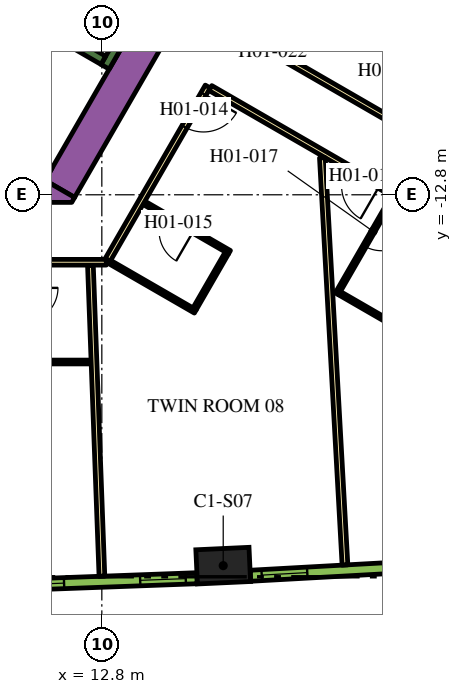
"""IFC4 building model, lengths in metres.
Left out: names, types, materials, properties, quantities, classifications, styles, units other than length and angle.
Written with IfcOpenShell. Run it as: python <this file> out.ifc"""

import sys

from ifc_helpers import new_model, si_unit, direction, frame, frame_2d, origin, origin_2d, place, context, subcontext, project, spatial, polyline, rectangle, outline, extrude, element, fill, save


model = new_model("IFC4")
c1 = context("Model", 3, precision=1e-05, world=origin(), true_north=direction((0.0, 1.0)))
c2 = subcontext(c1, "Body", "Model", "MODEL_VIEW")
j1 = project(units=[si_unit("LENGTHUNIT", "METRE"), si_unit("PLANEANGLEUNIT", "RADIAN")], contexts=[c1])
p1 = place(None, origin())
s1 = spatial("IfcSite", under=j1, at=p1, CompositionType="ELEMENT")
p2 = place(p1, origin())
s2 = spatial("IfcBuilding", under=s1, at=p2, CompositionType="ELEMENT")
p3 = place(p2, frame((0.0, 0.0, 31.5)))
s3 = spatial("IfcBuildingStorey", under=s2, at=p3, CompositionType="ELEMENT", Elevation=31.5)
p4 = place(p3, frame((15.994, -22.558, 0.0), z_axis=(0.0, 0.0, 1.0), x_axis=(0.998932216029, 0.04619986774, 0.0)))
e1 = element("IfcColumn", 1, at=p4, inside=s3, PredefinedType="COLUMN", context=c2, shape_type="SweptSolid", body=[
    extrude(rectangle(XDim=1.4, YDim=0.9, at=origin_2d()), origin(), (0.0, 0.0, 1.0), 3.9),
])
p5 = place(p3, frame((11.695, -12.644, 0.0), z_axis=(0.0, 0.0, 1.0), x_axis=(0.500010229568, 0.86601949766, 0.0)))
e2 = element("IfcWall", 2, at=p5, inside=s3, PredefinedType="SOLIDWALL", context=c2, shape_type="SweptSolid", body=[
    extrude(rectangle(XDim=9.326, YDim=0.9, at=frame_2d((4.663, 0.0))), origin(), (0.0, 0.0, 1.0), 3.9),
])
p6 = place(p3, origin())
e3 = element("IfcWall", 3, at=p6, inside=s3, PredefinedType="SOLIDWALL", context=c2, shape_type="SweptSolid", body=[
    extrude(outline(polyline([(12.009, -13.0), (11.312, -13.0), (11.312, -12.425), (12.083, -12.871), (12.009, -13.0)])), origin(), (0.0, 0.0, 1.0), 3.9),
])
p7 = place(p3, frame((12.885, -9.431, 0.0), z_axis=(0.0, 0.0, 1.0), x_axis=(0.500020560727, 0.866013532718, 0.0)))
e4 = element("IfcWall", 4, at=p7, inside=s3, PredefinedType="SOLIDWALL", context=c2, shape_type="SweptSolid", body=[
    extrude(rectangle(XDim=3.45, YDim=0.25, at=frame_2d((1.725, 0.0))), origin(), (0.0, 0.0, 1.0), 3.9),
])
p8 = place(p3, frame((12.84, -9.261, 0.0), z_axis=(0.0, 0.0, 1.0), x_axis=(-0.866013990052, 0.500019768644, 0.0)))
e5 = element("IfcWall", 5, at=p8, inside=s3, PredefinedType="SOLIDWALL", context=c2, shape_type="SweptSolid", body=[
    extrude(rectangle(XDim=6.8, YDim=0.25, at=frame_2d((3.4, 0.0))), origin(), (0.0, 0.0, 1.0), 3.9),
])
p9 = place(p3, frame((16.412, -8.523, 0.0), z_axis=(0.0, 0.0, 1.0), x_axis=(0.866022197818, -0.500005552856, 0.0)))
e6 = element("IfcWall", 6, at=p9, inside=s3, PredefinedType="PARTITIONING", context=c2, shape_type="SweptSolid", body=[
    extrude(rectangle(XDim=16.224, YDim=0.15, at=frame_2d((8.112, 0.0))), origin(), (0.0, 0.0, 1.0), 2.75),
])
p10 = place(p9, frame((7.949, 0.0, 0.0)))
e7 = element("IfcOpeningElement", 7, at=p10, cuts=e6, PredefinedType="OPENING", context=c2, shape_type="SweptSolid", body=[
    extrude(rectangle(XDim=1.0, YDim=2.1, at=frame_2d((0.5, 1.05))), frame((0.0, 0.085, 0.0), z_axis=(0.0, -1.0, 0.0), x_axis=(1.0, 0.0, 0.0)), (0.0, 0.0, 1.0), 0.17),
])
p11 = place(p9, frame((0.526, 0.0, 0.0)))
e8 = element("IfcOpeningElement", 8, at=p11, cuts=e6, PredefinedType="OPENING", context=c2, shape_type="SweptSolid", body=[
    extrude(rectangle(XDim=1.0, YDim=2.1, at=frame_2d((0.5, 1.05))), frame((0.0, 0.085, 0.0), z_axis=(0.0, -1.0, 0.0), x_axis=(1.0, 0.0, 0.0)), (0.0, 0.0, 1.0), 0.17),
])
p12 = place(p3, frame((12.918, -14.575, 0.0), z_axis=(0.0, 0.0, 1.0), x_axis=(-1.0, 0.0, 0.0)))
e9 = element("IfcWall", 9, at=p12, inside=s3, PredefinedType="PARTITIONING", context=c2, shape_type="SweptSolid", body=[
    extrude(rectangle(XDim=25.766, YDim=0.15, at=frame_2d((12.883, 0.0))), origin(), (0.0, 0.0, 1.0), 2.75),
])
p13 = place(p12, frame((24.586, 0.0, 0.0)))
e10 = element("IfcOpeningElement", 10, at=p13, cuts=e9, PredefinedType="OPENING", context=c2, shape_type="SweptSolid", body=[
    extrude(rectangle(XDim=1.0, YDim=2.1, at=frame_2d((0.5, 1.05))), frame((0.0, 0.085, 0.0), z_axis=(0.0, -1.0, 0.0), x_axis=(1.0, 0.0, 0.0)), (0.0, 0.0, 1.0), 0.17),
])
p14 = place(p12, frame((16.195, 0.0, 0.0)))
e11 = element("IfcOpeningElement", 11, at=p14, cuts=e9, PredefinedType="OPENING", context=c2, shape_type="SweptSolid", body=[
    extrude(rectangle(XDim=1.0, YDim=2.1, at=frame_2d((0.5, 1.05))), frame((0.0, 0.085, 0.0), z_axis=(0.0, -1.0, 0.0), x_axis=(1.0, 0.0, 0.0)), (0.0, 0.0, 1.0), 0.17),
])
p15 = place(p12, frame((14.066, 0.0, 0.0)))
e12 = element("IfcOpeningElement", 12, at=p15, cuts=e9, PredefinedType="OPENING", context=c2, shape_type="SweptSolid", body=[
    extrude(rectangle(XDim=0.9, YDim=2.1, at=frame_2d((0.45, 1.05))), frame((0.0, 0.085, 0.0), z_axis=(0.0, -1.0, 0.0), x_axis=(1.0, 0.0, 0.0)), (0.0, 0.0, 1.0), 0.17),
])
p16 = place(p12, frame((6.824, 0.0, 0.0)))
e13 = element("IfcOpeningElement", 13, at=p16, cuts=e9, PredefinedType="OPENING", context=c2, shape_type="SweptSolid", body=[
    extrude(rectangle(XDim=1.0, YDim=2.1, at=frame_2d((0.5, 1.05))), frame((0.0, 0.085, 0.0), z_axis=(0.0, -1.0, 0.0), x_axis=(1.0, 0.0, 0.0)), (0.0, 0.0, 1.0), 0.17),
])
p17 = place(p12, frame((5.517, 0.0, 0.0)))
e14 = element("IfcOpeningElement", 14, at=p17, cuts=e9, PredefinedType="OPENING", context=c2, shape_type="SweptSolid", body=[
    extrude(rectangle(XDim=1.0, YDim=2.1, at=frame_2d((0.5, 1.05))), frame((0.0, 0.085, 0.0), z_axis=(0.0, -1.0, 0.0), x_axis=(1.0, 0.0, 0.0)), (0.0, 0.0, 1.0), 0.17),
])
p18 = place(p3, frame((15.587, -9.952, 0.0), z_axis=(0.0, 0.0, 1.0), x_axis=(-0.500016618951, -0.866015808616, 0.0)))
e15 = element("IfcWall", 15, at=p18, inside=s3, PredefinedType="PARTITIONING", context=c2, shape_type="SweptSolid", body=[
    extrude(rectangle(XDim=5.268, YDim=0.15, at=frame_2d((2.634, 0.0))), origin(), (0.0, 0.0, 1.0), 2.75),
])
p19 = place(p18, frame((0.225, 0.0, 0.0)))
e16 = element("IfcOpeningElement", 16, at=p19, cuts=e15, PredefinedType="OPENING", context=c2, shape_type="SweptSolid", body=[
    extrude(rectangle(XDim=1.0, YDim=2.1, at=frame_2d((0.5, 1.05))), frame((0.0, 0.085, 0.0), z_axis=(0.0, -1.0, 0.0), x_axis=(1.0, 0.0, 0.0)), (0.0, 0.0, 1.0), 0.17),
])
p20 = place(p3, frame((29.638, -18.064, 0.0), z_axis=(0.0, 0.0, 1.0), x_axis=(-0.866026175601, 0.499998663172, 0.0)))
e17 = element("IfcWall", 17, at=p20, inside=s3, PredefinedType="PARTITIONING", context=c2, shape_type="SweptSolid", body=[
    extrude(rectangle(XDim=16.144, YDim=0.15, at=frame_2d((8.072, 0.0))), origin(), (0.0, 0.0, 1.0), 2.75),
])
p21 = place(p20, frame((11.004, 0.0, 0.0)))
e18 = element("IfcOpeningElement", 18, at=p21, cuts=e17, PredefinedType="OPENING", context=c2, shape_type="SweptSolid", body=[
    extrude(rectangle(XDim=1.0, YDim=2.1, at=frame_2d((0.5, 1.05))), frame((0.0, 0.085, 0.0), z_axis=(0.0, -1.0, 0.0), x_axis=(1.0, 0.0, 0.0)), (0.0, 0.0, 1.0), 0.17),
])
p22 = place(p20, frame((7.275, 0.0, 0.0)))
e19 = element("IfcOpeningElement", 19, at=p22, cuts=e17, PredefinedType="OPENING", context=c2, shape_type="SweptSolid", body=[
    extrude(rectangle(XDim=1.0, YDim=2.1, at=frame_2d((0.5, 1.05))), frame((0.0, 0.085, 0.0), z_axis=(0.0, -1.0, 0.0), x_axis=(1.0, 0.0, 0.0)), (0.0, 0.0, 1.0), 0.17),
])
p23 = place(p3, frame((12.802, -22.836, 0.0), z_axis=(0.0, 0.0, 1.0), x_axis=(-0.036969723281, 0.999316386116, 0.0)))
e20 = element("IfcWall", 20, at=p23, inside=s3, PredefinedType="PARTITIONING", context=c2, shape_type="SweptSolid", body=[
    extrude(rectangle(XDim=8.182, YDim=0.15, at=frame_2d((4.091, 0.0))), origin(), (0.0, 0.0, 1.0), 2.75),
])
p24 = place(p3, frame((19.198, -22.541, 0.0), z_axis=(0.0, 0.0, 1.0), x_axis=(-0.055432210572, 0.99846245299, 0.0)))
e21 = element("IfcWall", 21, at=p24, inside=s3, PredefinedType="PARTITIONING", context=c2, shape_type="SweptSolid", body=[
    extrude(rectangle(XDim=10.729, YDim=0.15, at=frame_2d((5.365, 0.0))), origin(), (0.0, 0.0, 1.0), 2.75),
])
p25 = place(p3, frame((10.806, -17.2, 0.0), z_axis=(0.0, 0.0, 1.0), x_axis=(1.0, 0.0, 0.0)))
e22 = element("IfcWall", 22, at=p25, inside=s3, PredefinedType="PARTITIONING", context=c2, shape_type="SweptSolid", body=[
    extrude(rectangle(XDim=1.71, YDim=0.1, at=frame_2d((0.855, 0.0))), origin(), (0.0, 0.0, 1.0), 2.75),
])
p26 = place(p3, frame((16.16, -14.31, 0.0), z_axis=(0.0, 0.0, 1.0), x_axis=(-0.866062058628, 0.499936506574, 0.0)))
e23 = element("IfcWall", 23, at=p26, inside=s3, PredefinedType="PARTITIONING", context=c2, shape_type="SweptSolid", body=[
    extrude(rectangle(XDim=2.6, YDim=0.1, at=frame_2d((1.3, 0.0))), origin(), (0.0, 0.0, 1.0), 2.75),
])
p27 = place(p26, frame((1.1, 0.0, 0.0)))
e24 = element("IfcOpeningElement", 24, at=p27, cuts=e23, PredefinedType="OPENING", context=c2, shape_type="SweptSolid", body=[
    extrude(rectangle(XDim=0.9, YDim=2.1, at=frame_2d((0.45, 1.05))), frame((0.0, 0.06, 0.0), z_axis=(0.0, -1.0, 0.0), x_axis=(1.0, 0.0, 0.0)), (0.0, 0.0, 1.0), 0.12),
])
p28 = place(p3, frame((16.092, -14.329, 0.0), z_axis=(0.0, 0.0, 1.0), x_axis=(-0.500062241894, -0.865989465428, 0.0)))
e25 = element("IfcWall", 25, at=p28, inside=s3, PredefinedType="PARTITIONING", context=c2, shape_type="SweptSolid", body=[
    extrude(rectangle(XDim=1.7, YDim=0.1, at=frame_2d((0.85, 0.0))), origin(), (0.0, 0.0, 1.0), 2.75),
])
p29 = place(p3, frame((13.008, -14.569, 0.0), z_axis=(0.0, 0.0, 1.0), x_axis=(0.865997922154, -0.500047596559, 0.0)))
e26 = element("IfcWall", 26, at=p29, inside=s3, PredefinedType="PARTITIONING", context=c2, shape_type="SweptSolid", body=[
    extrude(rectangle(XDim=2.6, YDim=0.1, at=frame_2d((1.3, 0.0))), origin(), (0.0, 0.0, 1.0), 2.75),
])
p30 = place(p3, frame((20.461, -12.852, 0.0), z_axis=(0.0, 0.0, 1.0), x_axis=(-0.49997559174, -0.866039495442, 0.0)))
e27 = element("IfcWall", 27, at=p30, inside=s3, PredefinedType="PARTITIONING", context=c2, shape_type="SweptSolid", body=[
    extrude(rectangle(XDim=2.95, YDim=0.1, at=frame_2d((1.475, 0.0))), origin(), (0.0, 0.0, 1.0), 2.75),
])
p31 = place(p30, frame((0.6, 0.0, 0.0)))
e28 = element("IfcOpeningElement", 28, at=p31, cuts=e27, PredefinedType="OPENING", context=c2, shape_type="SweptSolid", body=[
    extrude(rectangle(XDim=0.9, YDim=2.1, at=frame_2d((0.45, 1.05))), frame((0.0, 0.06, 0.0), z_axis=(0.0, -1.0, 0.0), x_axis=(1.0, 0.0, 0.0)), (0.0, 0.0, 1.0), 0.12),
])
p32 = place(p3, frame((19.054, -15.389, 0.0), z_axis=(0.0, 0.0, 1.0), x_axis=(0.866043940782, -0.499967891604, 0.0)))
e29 = element("IfcWall", 29, at=p32, inside=s3, PredefinedType="PARTITIONING", context=c2, shape_type="SweptSolid", body=[
    extrude(rectangle(XDim=1.55, YDim=0.1, at=frame_2d((0.775, 0.0))), origin(), (0.0, 0.0, 1.0), 2.75),
])
p33 = place(p3, frame((10.31, -23.074, 0.0), z_axis=(0.0, 0.0, 1.0), x_axis=(0.999317974969, 0.036926750529, 0.0)))
e30 = element("IfcWall", 30, at=p33, inside=s3, PredefinedType="SOLIDWALL", context=c2, shape_type="SweptSolid", body=[
    extrude(rectangle(XDim=4.998, YDim=0.29, at=frame_2d((2.499, 0.0))), origin(), (0.0, 0.0, 1.0), 3.65),
])
p34 = place(p33, frame((0.297, 0.0, 0.9)))
e31 = element("IfcOpeningElement", 31, at=p34, cuts=e30, PredefinedType="OPENING", context=c2, shape_type="SweptSolid", body=[
    extrude(rectangle(XDim=1.2, YDim=2.15, at=frame_2d((0.6, 1.075))), frame((0.0, 0.155, 0.0), z_axis=(0.0, -1.0, 0.0), x_axis=(1.0, 0.0, 0.0)), (0.0, 0.0, 1.0), 0.31),
])
p35 = place(p33, frame((3.501, 0.0, 0.9)))
e32 = element("IfcOpeningElement", 32, at=p35, cuts=e30, PredefinedType="OPENING", context=c2, shape_type="SweptSolid", body=[
    extrude(rectangle(XDim=1.2, YDim=2.15, at=frame_2d((0.6, 1.075))), frame((0.0, 0.155, 0.0), z_axis=(0.0, -1.0, 0.0), x_axis=(1.0, 0.0, 0.0)), (0.0, 0.0, 1.0), 0.31),
])
p36 = place(p3, frame((16.711, -22.824, 0.0), z_axis=(0.0, 0.0, 1.0), x_axis=(0.998464708705, 0.055391564976, 0.0)))
e33 = element("IfcWall", 33, at=p36, inside=s3, PredefinedType="SOLIDWALL", context=c2, shape_type="SweptSolid", body=[
    extrude(rectangle(XDim=4.998, YDim=0.29, at=frame_2d((2.499, 0.0))), origin(), (0.0, 0.0, 1.0), 3.65),
])
p37 = place(p36, frame((0.297, 0.0, 0.9)))
e34 = element("IfcOpeningElement", 34, at=p37, cuts=e33, PredefinedType="OPENING", context=c2, shape_type="SweptSolid", body=[
    extrude(rectangle(XDim=1.2, YDim=2.15, at=frame_2d((0.6, 1.075))), frame((0.0, 0.155, 0.0), z_axis=(0.0, -1.0, 0.0), x_axis=(1.0, 0.0, 0.0)), (0.0, 0.0, 1.0), 0.31),
])
p38 = place(p36, frame((3.501, 0.0, 0.9)))
e35 = element("IfcOpeningElement", 35, at=p38, cuts=e33, PredefinedType="OPENING", context=c2, shape_type="SweptSolid", body=[
    extrude(rectangle(XDim=1.2, YDim=2.15, at=frame_2d((0.6, 1.075))), frame((0.0, 0.155, 0.0), z_axis=(0.0, -1.0, 0.0), x_axis=(1.0, 0.0, 0.0)), (0.0, 0.0, 1.0), 0.31),
])
p39 = place(p19, origin())
e36 = element("IfcDoor", 36, at=p39, inside=s3, OperationType="SINGLE_SWING_LEFT", PredefinedType="DOOR", context=c2, shape_type="SweptSolid", body=[
    extrude(rectangle(XDim=1.0, YDim=2.1, at=frame_2d((0.5, 1.05))), frame((0.0, 0.025, 0.0), z_axis=(0.0, -1.0, 0.0), x_axis=(1.0, 0.0, 0.0)), (0.0, 0.0, 1.0), 0.05),
])
fill(e16, e36)
p40 = place(p27, origin())
e37 = element("IfcDoor", 37, at=p40, inside=s3, OperationType="SINGLE_SWING_LEFT", PredefinedType="DOOR", context=c2, shape_type="SweptSolid", body=[
    extrude(rectangle(XDim=0.9, YDim=2.1, at=frame_2d((0.45, 1.05))), frame((0.0, 0.025, 0.0), z_axis=(0.0, -1.0, 0.0), x_axis=(1.0, 0.0, 0.0)), (0.0, 0.0, 1.0), 0.05),
])
fill(e24, e37)
p41 = place(p21, origin())
e38 = element("IfcDoor", 38, at=p41, inside=s3, OperationType="SINGLE_SWING_RIGHT", PredefinedType="DOOR", context=c2, shape_type="SweptSolid", body=[
    extrude(rectangle(XDim=1.0, YDim=2.1, at=frame_2d((0.5, 1.05))), frame((0.0, 0.025, 0.0), z_axis=(0.0, -1.0, 0.0), x_axis=(1.0, 0.0, 0.0)), (0.0, 0.0, 1.0), 0.05),
])
fill(e18, e38)
p42 = place(p31, origin())
e39 = element("IfcDoor", 39, at=p42, inside=s3, OperationType="SINGLE_SWING_RIGHT", PredefinedType="DOOR", context=c2, shape_type="SweptSolid", body=[
    extrude(rectangle(XDim=0.9, YDim=2.1, at=frame_2d((0.45, 1.05))), frame((0.0, 0.025, 0.0), z_axis=(0.0, -1.0, 0.0), x_axis=(1.0, 0.0, 0.0)), (0.0, 0.0, 1.0), 0.05),
])
fill(e28, e39)
p43 = place(p11, origin())
e40 = element("IfcDoor", 40, at=p43, inside=s3, OperationType="SINGLE_SWING_LEFT", PredefinedType="DOOR", context=c2, shape_type="SweptSolid", body=[
    extrude(rectangle(XDim=1.0, YDim=2.1, at=frame_2d((0.5, 1.05))), frame((0.0, 0.025, 0.0), z_axis=(0.0, -1.0, 0.0), x_axis=(1.0, 0.0, 0.0)), (0.0, 0.0, 1.0), 0.05),
])
fill(e8, e40)
p44 = place(p34, origin())
e41 = element("IfcWindow", 41, at=p44, inside=s3, PartitioningType="DOUBLE_PANEL_VERTICAL", PredefinedType="WINDOW", context=c2, shape_type="SweptSolid", body=[
    extrude(rectangle(XDim=1.2, YDim=2.15, at=frame_2d((0.6, 1.075))), frame((0.0, 0.015, 0.0), z_axis=(0.0, -1.0, 0.0), x_axis=(1.0, 0.0, 0.0)), (0.0, 0.0, 1.0), 0.06),
])
fill(e31, e41)
p45 = place(p35, origin())
e42 = element("IfcWindow", 42, at=p45, inside=s3, PartitioningType="DOUBLE_PANEL_VERTICAL", PredefinedType="WINDOW", context=c2, shape_type="SweptSolid", body=[
    extrude(rectangle(XDim=1.2, YDim=2.15, at=frame_2d((0.6, 1.075))), frame((0.0, 0.015, 0.0), z_axis=(0.0, -1.0, 0.0), x_axis=(1.0, 0.0, 0.0)), (0.0, 0.0, 1.0), 0.06),
])
fill(e32, e42)
p46 = place(p37, origin())
e43 = element("IfcWindow", 43, at=p46, inside=s3, PartitioningType="DOUBLE_PANEL_VERTICAL", PredefinedType="WINDOW", context=c2, shape_type="SweptSolid", body=[
    extrude(rectangle(XDim=1.2, YDim=2.15, at=frame_2d((0.6, 1.075))), frame((0.0, 0.015, 0.0), z_axis=(0.0, -1.0, 0.0), x_axis=(1.0, 0.0, 0.0)), (0.0, 0.0, 1.0), 0.06),
])
fill(e34, e43)
save(model, sys.argv[1])
